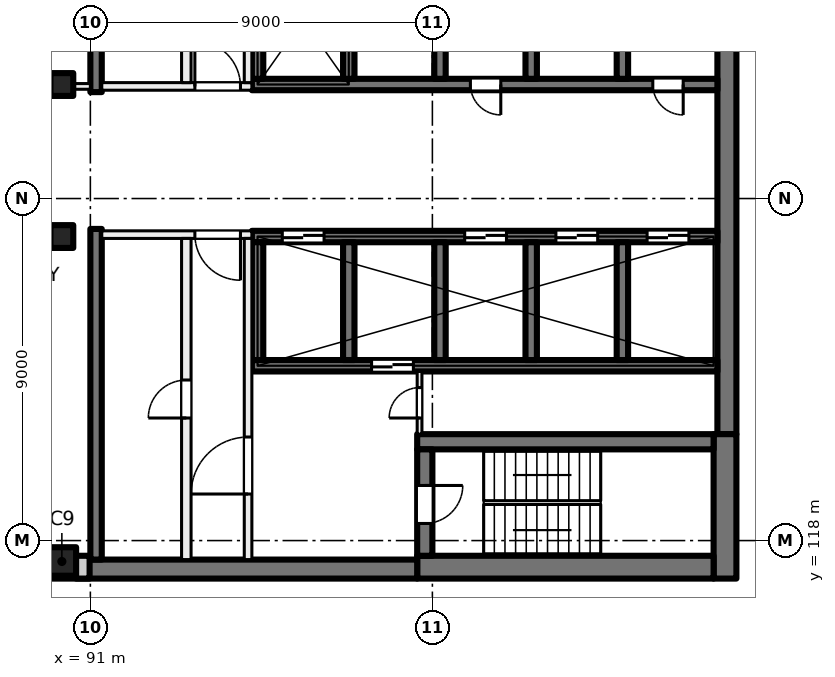
"""IFC4 building model, lengths in metres.
Left out: names, types, materials, properties, quantities, classifications, styles, units other than length and angle.
Written with IfcOpenShell. Run it as: python <this file> out.ifc"""

import sys

from ifc_helpers import new_model, si_unit, direction, frame, frame_2d, origin, origin_2d, place, context, subcontext, project, spatial, rectangle, extrude, element, fill, save


model = new_model("IFC4")
c1 = context("Model", 3, precision=1e-05, world=origin(), true_north=direction((0.0, 1.0)))
c2 = subcontext(c1, "Body", "Model", "MODEL_VIEW")
j1 = project(units=[si_unit("LENGTHUNIT", "METRE"), si_unit("PLANEANGLEUNIT", "RADIAN")], contexts=[c1])
p1 = place(None, origin())
s1 = spatial("IfcSite", under=j1, at=p1, CompositionType="ELEMENT")
p2 = place(p1, origin())
s2 = spatial("IfcBuilding", under=s1, at=p2, CompositionType="ELEMENT")
p3 = place(p2, frame((0.0, 0.0, 196.0)))
s3 = spatial("IfcBuildingStorey", under=s2, at=p3, CompositionType="ELEMENT", Elevation=196.0)
for number, where, z_axis, x_axis in (
    (1, (90.25, 130.0, 0.0), (0.0, 0.0, 1.0), (1.0, 0.0, 0.0)),
    (2, (90.25, 126.0, 0.0), (0.0, 0.0, 1.0), (1.0, 0.0, 0.0)),
):
    element("IfcColumn", number, at=place(p3, frame(where, z_axis=z_axis, x_axis=x_axis)), inside=s3, PredefinedType="COLUMN", context=c2, shape_type="SweptSolid", body=[
        extrude(rectangle(XDim=0.6, YDim=0.6, at=origin_2d()), origin(), (0.0, 0.0, 1.0), 4.0),
    ])
p4 = place(p3, frame((90.25, 117.45, 0.0), z_axis=(0.0, 0.0, 1.0), x_axis=(1.0, 0.0, 0.0)))
e3 = element("IfcColumn", 3, at=p4, inside=s3, PredefinedType="COLUMN", context=c2, shape_type="SweptSolid", body=[
    extrude(rectangle(XDim=0.75, YDim=0.75, at=origin_2d()), origin(), (0.0, 0.0, 1.0), 4.0),
])
p5 = place(p3, frame((107.75, 135.2, 0.0), z_axis=(0.0, 0.0, 1.0), x_axis=(0.0, -1.0, 0.0)))
e4 = element("IfcWall", 4, at=p5, inside=s3, PredefinedType="SHEAR", context=c2, shape_type="SweptSolid", body=[
    extrude(rectangle(XDim=14.4, YDim=0.5, at=frame_2d((7.2, 0.0))), origin(), (0.0, 0.0, 1.0), 4.0),
])
p6 = place(p3, frame((107.7, 120.8, 0.0), z_axis=(0.0, 0.0, 1.0), x_axis=(0.0, -1.0, 0.0)))
e5 = element("IfcWall", 5, at=p6, inside=s3, PredefinedType="SHEAR", context=c2, shape_type="SweptSolid", body=[
    extrude(rectangle(XDim=3.8, YDim=0.6, at=frame_2d((1.9, 0.0))), origin(), (0.0, 0.0, 1.0), 4.0),
])
p7 = place(p3, frame((107.4, 117.3, 0.0), z_axis=(0.0, 0.0, 1.0), x_axis=(-1.0, 0.0, 0.0)))
e6 = element("IfcWall", 6, at=p7, inside=s3, PredefinedType="SHEAR", context=c2, shape_type="SweptSolid", body=[
    extrude(rectangle(XDim=7.8, YDim=0.6, at=frame_2d((3.9, 0.0))), origin(), (0.0, 0.0, 1.0), 4.0),
])
p8 = place(p3, frame((99.6, 117.25, 0.0), z_axis=(0.0, 0.0, 1.0), x_axis=(-1.0, 0.0, 0.0)))
e7 = element("IfcWall", 7, at=p8, inside=s3, PredefinedType="SHEAR", context=c2, shape_type="SweptSolid", body=[
    extrude(rectangle(XDim=8.975, YDim=0.5, at=frame_2d((4.488, 0.0))), origin(), (0.0, 0.0, 1.0), 4.0),
])
p9 = place(p3, frame((107.4, 120.6, 0.0), z_axis=(0.0, 0.0, 1.0), x_axis=(-1.0, 0.0, 0.0)))
e8 = element("IfcWall", 8, at=p9, inside=s3, PredefinedType="SHEAR", context=c2, shape_type="SweptSolid", body=[
    extrude(rectangle(XDim=7.8, YDim=0.4, at=frame_2d((3.9, 0.0))), origin(), (0.0, 0.0, 1.0), 4.0),
])
p10 = place(p3, frame((99.8, 120.4, 0.0), z_axis=(0.0, 0.0, 1.0), x_axis=(0.0, -1.0, 0.0)))
e9 = element("IfcWall", 9, at=p10, inside=s3, PredefinedType="SHEAR", context=c2, shape_type="SweptSolid", body=[
    extrude(rectangle(XDim=2.8, YDim=0.4, at=frame_2d((1.4, 0.0))), origin(), (0.0, 0.0, 1.0), 4.0),
])
p11 = place(p10, frame((0.95, 0.0, 0.0)))
e10 = element("IfcOpeningElement", 10, at=p11, cuts=e9, PredefinedType="OPENING", context=c2, shape_type="SweptSolid", body=[
    extrude(rectangle(XDim=1.0, YDim=2.1, at=frame_2d((0.5, 1.05))), frame((0.0, 0.21, 0.0), z_axis=(0.0, -1.0, 0.0), x_axis=(1.0, 0.0, 0.0)), (0.0, 0.0, 1.0), 0.42),
])
p12 = place(p3, frame((107.5, 130.0, 0.0), z_axis=(0.0, 0.0, 1.0), x_axis=(-1.0, 0.0, 0.0)))
e11 = element("IfcWall", 11, at=p12, inside=s3, PredefinedType="SHEAR", context=c2, shape_type="SweptSolid", body=[
    extrude(rectangle(XDim=12.25, YDim=0.3, at=frame_2d((6.125, 0.0))), origin(), (0.0, 0.0, 1.0), 4.0),
])
p13 = place(p12, frame((0.9, 0.0, 0.0)))
e12 = element("IfcOpeningElement", 12, at=p13, cuts=e11, PredefinedType="OPENING", context=c2, shape_type="SweptSolid", body=[
    extrude(rectangle(XDim=0.8, YDim=2.1, at=frame_2d((0.4, 1.05))), frame((0.0, 0.16, 0.0), z_axis=(0.0, -1.0, 0.0), x_axis=(1.0, 0.0, 0.0)), (0.0, 0.0, 1.0), 0.32),
])
p14 = place(p12, frame((5.7, 0.0, 0.0)))
e13 = element("IfcOpeningElement", 13, at=p14, cuts=e11, PredefinedType="OPENING", context=c2, shape_type="SweptSolid", body=[
    extrude(rectangle(XDim=0.8, YDim=2.1, at=frame_2d((0.4, 1.05))), frame((0.0, 0.16, 0.0), z_axis=(0.0, -1.0, 0.0), x_axis=(1.0, 0.0, 0.0)), (0.0, 0.0, 1.0), 0.32),
])
for number, where, z_axis, x_axis in (
    (14, (105.0, 133.25, 0.0), (0.0, 0.0, 1.0), (0.0, -1.0, 0.0)),
    (15, (102.6, 133.25, 0.0), (0.0, 0.0, 1.0), (0.0, -1.0, 0.0)),
    (16, (100.2, 133.25, 0.0), (0.0, 0.0, 1.0), (0.0, -1.0, 0.0)),
    (17, (97.8, 133.25, 0.0), (0.0, 0.0, 1.0), (0.0, -1.0, 0.0)),
    (18, (95.4, 133.25, 0.0), (0.0, 0.0, 1.0), (0.0, -1.0, 0.0)),
):
    element("IfcWall", number, at=place(p3, frame(where, z_axis=z_axis, x_axis=x_axis)), inside=s3, PredefinedType="SHEAR", context=c2, shape_type="SweptSolid", body=[
        extrude(rectangle(XDim=3.1, YDim=0.3, at=frame_2d((1.55, 0.0))), origin(), (0.0, 0.0, 1.0), 4.0),
    ])
p15 = place(p3, frame((107.5, 126.0, 0.0), z_axis=(0.0, 0.0, 1.0), x_axis=(-1.0, 0.0, 0.0)))
e19 = element("IfcWall", 19, at=p15, inside=s3, PredefinedType="SHEAR", context=c2, shape_type="SweptSolid", body=[
    extrude(rectangle(XDim=12.25, YDim=0.3, at=frame_2d((6.125, 0.0))), origin(), (0.0, 0.0, 1.0), 4.0),
])
p16 = place(p15, frame((0.75, 0.0, 0.0)))
e20 = element("IfcOpeningElement", 20, at=p16, cuts=e19, PredefinedType="OPENING", context=c2, shape_type="SweptSolid", body=[
    extrude(rectangle(XDim=1.1, YDim=2.1, at=frame_2d((0.55, 1.05))), frame((0.0, 0.16, 0.0), z_axis=(0.0, -1.0, 0.0), x_axis=(1.0, 0.0, 0.0)), (0.0, 0.0, 1.0), 0.32),
])
p17 = place(p15, frame((3.15, 0.0, 0.0)))
e21 = element("IfcOpeningElement", 21, at=p17, cuts=e19, PredefinedType="OPENING", context=c2, shape_type="SweptSolid", body=[
    extrude(rectangle(XDim=1.1, YDim=2.1, at=frame_2d((0.55, 1.05))), frame((0.0, 0.16, 0.0), z_axis=(0.0, -1.0, 0.0), x_axis=(1.0, 0.0, 0.0)), (0.0, 0.0, 1.0), 0.32),
])
p18 = place(p15, frame((5.55, 0.0, 0.0)))
e22 = element("IfcOpeningElement", 22, at=p18, cuts=e19, PredefinedType="OPENING", context=c2, shape_type="SweptSolid", body=[
    extrude(rectangle(XDim=1.1, YDim=2.1, at=frame_2d((0.55, 1.05))), frame((0.0, 0.16, 0.0), z_axis=(0.0, -1.0, 0.0), x_axis=(1.0, 0.0, 0.0)), (0.0, 0.0, 1.0), 0.32),
])
p19 = place(p15, frame((10.35, 0.0, 0.0)))
e23 = element("IfcOpeningElement", 23, at=p19, cuts=e19, PredefinedType="OPENING", context=c2, shape_type="SweptSolid", body=[
    extrude(rectangle(XDim=1.1, YDim=2.1, at=frame_2d((0.55, 1.05))), frame((0.0, 0.16, 0.0), z_axis=(0.0, -1.0, 0.0), x_axis=(1.0, 0.0, 0.0)), (0.0, 0.0, 1.0), 0.32),
])
p20 = place(p3, frame((107.5, 122.6, 0.0), z_axis=(0.0, 0.0, 1.0), x_axis=(-1.0, 0.0, 0.0)))
e24 = element("IfcWall", 24, at=p20, inside=s3, PredefinedType="SHEAR", context=c2, shape_type="SweptSolid", body=[
    extrude(rectangle(XDim=12.25, YDim=0.3, at=frame_2d((6.125, 0.0))), origin(), (0.0, 0.0, 1.0), 4.0),
])
p21 = place(p20, frame((8.0, 0.0, 0.0)))
e25 = element("IfcOpeningElement", 25, at=p21, cuts=e24, PredefinedType="OPENING", context=c2, shape_type="SweptSolid", body=[
    extrude(rectangle(XDim=1.1, YDim=2.1, at=frame_2d((0.55, 1.05))), frame((0.0, 0.16, 0.0), z_axis=(0.0, -1.0, 0.0), x_axis=(1.0, 0.0, 0.0)), (0.0, 0.0, 1.0), 0.32),
])
for number, where, z_axis, x_axis in (
    (26, (105.0, 125.85, 0.0), (0.0, 0.0, 1.0), (0.0, -1.0, 0.0)),
    (27, (102.6, 125.85, 0.0), (0.0, 0.0, 1.0), (0.0, -1.0, 0.0)),
    (28, (100.2, 125.85, 0.0), (0.0, 0.0, 1.0), (0.0, -1.0, 0.0)),
    (29, (97.8, 125.85, 0.0), (0.0, 0.0, 1.0), (0.0, -1.0, 0.0)),
    (30, (95.4, 125.85, 0.0), (0.0, 0.0, 1.0), (0.0, -1.0, 0.0)),
):
    element("IfcWall", number, at=place(p3, frame(where, z_axis=z_axis, x_axis=x_axis)), inside=s3, PredefinedType="SHEAR", context=c2, shape_type="SweptSolid", body=[
        extrude(rectangle(XDim=3.1, YDim=0.3, at=frame_2d((1.55, 0.0))), origin(), (0.0, 0.0, 1.0), 4.0),
    ])
for number, where, z_axis, x_axis in (
    (31, (91.15, 138.5, 0.0), (0.0, 0.0, 1.0), (0.0, -1.0, 0.0)),
    (32, (91.15, 126.2, 0.0), (0.0, 0.0, 1.0), (0.0, -1.0, 0.0)),
):
    element("IfcWall", number, at=place(p3, frame(where, z_axis=z_axis, x_axis=x_axis)), inside=s3, PredefinedType="SHEAR", context=c2, shape_type="SweptSolid", body=[
        extrude(rectangle(XDim=8.7, YDim=0.3, at=frame_2d((4.35, 0.0))), origin(), (0.0, 0.0, 1.0), 4.0),
    ])
p22 = place(p3, frame((90.98, 117.3, 0.0), z_axis=(0.0, 0.0, 1.0), x_axis=(-1.0, 0.0, 0.0)))
e33 = element("IfcWall", 33, at=p22, inside=s3, PredefinedType="SOLIDWALL", context=c2, shape_type="SweptSolid", body=[
    extrude(rectangle(XDim=33.745, YDim=0.6, at=frame_2d((16.873, 0.0))), origin(), (0.0, 0.0, 1.0), 3.625),
])
p23 = place(p22, frame((1.48, 0.0, 0.9)))
e34 = element("IfcOpeningElement", 34, at=p23, cuts=e33, PredefinedType="OPENING", context=c2, shape_type="SweptSolid", body=[
    extrude(rectangle(XDim=3.0, YDim=2.4, at=frame_2d((1.5, 1.2))), frame((0.0, 0.31, 0.0), z_axis=(0.0, -1.0, 0.0), x_axis=(1.0, 0.0, 0.0)), (0.0, 0.0, 1.0), 0.62),
])
p24 = place(p22, frame((5.98, 0.0, 0.9)))
e35 = element("IfcOpeningElement", 35, at=p24, cuts=e33, PredefinedType="OPENING", context=c2, shape_type="SweptSolid", body=[
    extrude(rectangle(XDim=3.0, YDim=2.4, at=frame_2d((1.5, 1.2))), frame((0.0, 0.31, 0.0), z_axis=(0.0, -1.0, 0.0), x_axis=(1.0, 0.0, 0.0)), (0.0, 0.0, 1.0), 0.62),
])
p25 = place(p22, frame((10.48, 0.0, 0.9)))
e36 = element("IfcOpeningElement", 36, at=p25, cuts=e33, PredefinedType="OPENING", context=c2, shape_type="SweptSolid", body=[
    extrude(rectangle(XDim=3.0, YDim=2.4, at=frame_2d((1.5, 1.2))), frame((0.0, 0.31, 0.0), z_axis=(0.0, -1.0, 0.0), x_axis=(1.0, 0.0, 0.0)), (0.0, 0.0, 1.0), 0.62),
])
p26 = place(p22, frame((14.98, 0.0, 0.9)))
e37 = element("IfcOpeningElement", 37, at=p26, cuts=e33, PredefinedType="OPENING", context=c2, shape_type="SweptSolid", body=[
    extrude(rectangle(XDim=3.0, YDim=2.4, at=frame_2d((1.5, 1.2))), frame((0.0, 0.31, 0.0), z_axis=(0.0, -1.0, 0.0), x_axis=(1.0, 0.0, 0.0)), (0.0, 0.0, 1.0), 0.62),
])
p27 = place(p22, frame((19.48, 0.0, 0.9)))
e38 = element("IfcOpeningElement", 38, at=p27, cuts=e33, PredefinedType="OPENING", context=c2, shape_type="SweptSolid", body=[
    extrude(rectangle(XDim=3.0, YDim=2.4, at=frame_2d((1.5, 1.2))), frame((0.0, 0.31, 0.0), z_axis=(0.0, -1.0, 0.0), x_axis=(1.0, 0.0, 0.0)), (0.0, 0.0, 1.0), 0.62),
])
p28 = place(p22, frame((23.98, 0.0, 0.9)))
e39 = element("IfcOpeningElement", 39, at=p28, cuts=e33, PredefinedType="OPENING", context=c2, shape_type="SweptSolid", body=[
    extrude(rectangle(XDim=3.0, YDim=2.4, at=frame_2d((1.5, 1.2))), frame((0.0, 0.31, 0.0), z_axis=(0.0, -1.0, 0.0), x_axis=(1.0, 0.0, 0.0)), (0.0, 0.0, 1.0), 0.62),
])
p29 = place(p22, frame((28.48, 0.0, 0.9)))
e40 = element("IfcOpeningElement", 40, at=p29, cuts=e33, PredefinedType="OPENING", context=c2, shape_type="SweptSolid", body=[
    extrude(rectangle(XDim=3.0, YDim=2.4, at=frame_2d((1.5, 1.2))), frame((0.0, 0.31, 0.0), z_axis=(0.0, -1.0, 0.0), x_axis=(1.0, 0.0, 0.0)), (0.0, 0.0, 1.0), 0.62),
])
p30 = place(p3, frame((95.25, 126.05, 0.0), z_axis=(0.0, 0.0, 1.0), x_axis=(-1.0, 0.0, 0.0)))
e41 = element("IfcWall", 41, at=p30, inside=s3, PredefinedType="PARTITIONING", context=c2, shape_type="SweptSolid", body=[
    extrude(rectangle(XDim=3.95, YDim=0.2, at=frame_2d((1.975, 0.0))), origin(), (0.0, 0.0, 1.0), 3.625),
])
p31 = place(p30, frame((0.3, 0.0, 0.0)))
e42 = element("IfcOpeningElement", 42, at=p31, cuts=e41, PredefinedType="OPENING", context=c2, shape_type="SweptSolid", body=[
    extrude(rectangle(XDim=1.2, YDim=2.1, at=frame_2d((0.6, 1.05))), frame((0.0, 0.11, 0.0), z_axis=(0.0, -1.0, 0.0), x_axis=(1.0, 0.0, 0.0)), (0.0, 0.0, 1.0), 0.22),
])
p32 = place(p3, frame((95.15, 117.5, 0.0), z_axis=(0.0, 0.0, 1.0), x_axis=(0.0, 1.0, 0.0)))
e43 = element("IfcWall", 43, at=p32, inside=s3, PredefinedType="PARTITIONING", context=c2, shape_type="SweptSolid", body=[
    extrude(rectangle(XDim=8.45, YDim=0.2, at=frame_2d((4.225, 0.0))), origin(), (0.0, 0.0, 1.0), 3.625),
])
p33 = place(p32, frame((1.725, 0.0, 0.0)))
e44 = element("IfcOpeningElement", 44, at=p33, cuts=e43, PredefinedType="OPENING", context=c2, shape_type="SweptSolid", body=[
    extrude(rectangle(XDim=1.5, YDim=2.1, at=frame_2d((0.75, 1.05))), frame((0.0, 0.11, 0.0), z_axis=(0.0, -1.0, 0.0), x_axis=(1.0, 0.0, 0.0)), (0.0, 0.0, 1.0), 0.22),
])
p34 = place(p3, frame((93.525, 117.5, 0.0), z_axis=(0.0, 0.0, 1.0), x_axis=(0.0, 1.0, 0.0)))
e45 = element("IfcWall", 45, at=p34, inside=s3, PredefinedType="PARTITIONING", context=c2, shape_type="SweptSolid", body=[
    extrude(rectangle(XDim=8.45, YDim=0.25, at=frame_2d((4.225, 0.0))), origin(), (0.0, 0.0, 1.0), 3.625),
])
p35 = place(p34, frame((3.725, 0.0, 0.0)))
e46 = element("IfcOpeningElement", 46, at=p35, cuts=e45, PredefinedType="OPENING", context=c2, shape_type="SweptSolid", body=[
    extrude(rectangle(XDim=1.0, YDim=2.1, at=frame_2d((0.5, 1.05))), frame((0.0, 0.135, 0.0), z_axis=(0.0, -1.0, 0.0), x_axis=(1.0, 0.0, 0.0)), (0.0, 0.0, 1.0), 0.27),
])
p36 = place(p3, frame((99.663, 120.8, 0.0), z_axis=(0.0, 0.0, 1.0), x_axis=(0.0, 1.0, 0.0)))
e47 = element("IfcWall", 47, at=p36, inside=s3, PredefinedType="PARTITIONING", context=c2, shape_type="SweptSolid", body=[
    extrude(rectangle(XDim=1.65, YDim=0.125, at=frame_2d((0.825, 0.0))), origin(), (0.0, 0.0, 1.0), 3.625),
])
p37 = place(p36, frame((0.425, 0.0, 0.0)))
e48 = element("IfcOpeningElement", 48, at=p37, cuts=e47, PredefinedType="OPENING", context=c2, shape_type="SweptSolid", body=[
    extrude(rectangle(XDim=0.8, YDim=2.1, at=frame_2d((0.4, 1.05))), frame((0.0, 0.073, 0.0), z_axis=(0.0, -1.0, 0.0), x_axis=(1.0, 0.0, 0.0)), (0.0, 0.0, 1.0), 0.145),
])
p38 = place(p3, frame((91.3, 129.95, 0.0), z_axis=(0.0, 0.0, 1.0), x_axis=(1.0, 0.0, 0.0)))
e49 = element("IfcWall", 49, at=p38, inside=s3, PredefinedType="PARTITIONING", context=c2, shape_type="SweptSolid", body=[
    extrude(rectangle(XDim=3.95, YDim=0.2, at=frame_2d((1.975, 0.0))), origin(), (0.0, 0.0, 1.0), 3.625),
])
p39 = place(p38, frame((2.45, 0.0, 0.0)))
e50 = element("IfcOpeningElement", 50, at=p39, cuts=e49, PredefinedType="OPENING", context=c2, shape_type="SweptSolid", body=[
    extrude(rectangle(XDim=1.2, YDim=2.1, at=frame_2d((0.6, 1.05))), frame((0.0, 0.11, 0.0), z_axis=(0.0, -1.0, 0.0), x_axis=(1.0, 0.0, 0.0)), (0.0, 0.0, 1.0), 0.22),
])
p40 = place(p3, frame((95.15, 130.05, 0.0), z_axis=(0.0, 0.0, 1.0), x_axis=(0.0, 1.0, 0.0)))
e51 = element("IfcWall", 51, at=p40, inside=s3, PredefinedType="PARTITIONING", context=c2, shape_type="SweptSolid", body=[
    extrude(rectangle(XDim=8.45, YDim=0.2, at=frame_2d((4.225, 0.0))), origin(), (0.0, 0.0, 1.0), 3.625),
])
p41 = place(p40, frame((5.225, 0.0, 0.0)))
e52 = element("IfcOpeningElement", 52, at=p41, cuts=e51, PredefinedType="OPENING", context=c2, shape_type="SweptSolid", body=[
    extrude(rectangle(XDim=1.5, YDim=2.1, at=frame_2d((0.75, 1.05))), frame((0.0, 0.11, 0.0), z_axis=(0.0, -1.0, 0.0), x_axis=(1.0, 0.0, 0.0)), (0.0, 0.0, 1.0), 0.22),
])
p42 = place(p3, frame((93.525, 130.05, 0.0), z_axis=(0.0, 0.0, 1.0), x_axis=(0.0, 1.0, 0.0)))
e53 = element("IfcWall", 53, at=p42, inside=s3, PredefinedType="PARTITIONING", context=c2, shape_type="SweptSolid", body=[
    extrude(rectangle(XDim=8.45, YDim=0.25, at=frame_2d((4.225, 0.0))), origin(), (0.0, 0.0, 1.0), 3.625),
])
p43 = place(p42, frame((2.39, 0.0, 0.0)))
e54 = element("IfcOpeningElement", 54, at=p43, cuts=e53, PredefinedType="OPENING", context=c2, shape_type="SweptSolid", body=[
    extrude(rectangle(XDim=0.8, YDim=2.1, at=frame_2d((0.4, 1.05))), frame((0.0, 0.135, 0.0), z_axis=(0.0, -1.0, 0.0), x_axis=(1.0, 0.0, 0.0)), (0.0, 0.0, 1.0), 0.27),
])
p44 = place(p42, frame((6.565, 0.0, 0.0)))
e55 = element("IfcOpeningElement", 55, at=p44, cuts=e53, PredefinedType="OPENING", context=c2, shape_type="SweptSolid", body=[
    extrude(rectangle(XDim=1.0, YDim=2.1, at=frame_2d((0.5, 1.05))), frame((0.0, 0.135, 0.0), z_axis=(0.0, -1.0, 0.0), x_axis=(1.0, 0.0, 0.0)), (0.0, 0.0, 1.0), 0.27),
])
p45 = place(p3, frame((85.825, 129.95, 0.0), z_axis=(0.0, 0.0, 1.0), x_axis=(1.0, 0.0, 0.0)))
e56 = element("IfcWall", 56, at=p45, inside=s3, PredefinedType="PARTITIONING", context=c2, shape_type="SweptSolid", body=[
    extrude(rectangle(XDim=5.175, YDim=0.15, at=frame_2d((2.587, 0.0))), origin(), (0.0, 0.0, 1.0), 3.625),
])
p46 = place(p45, frame((2.077, 0.0, 0.0)))
e57 = element("IfcOpeningElement", 57, at=p46, cuts=e56, PredefinedType="OPENING", context=c2, shape_type="SweptSolid", body=[
    extrude(rectangle(XDim=1.0, YDim=2.1, at=frame_2d((0.5, 1.05))), frame((0.0, 0.085, 0.0), z_axis=(0.0, -1.0, 0.0), x_axis=(1.0, 0.0, 0.0)), (0.0, 0.0, 1.0), 0.17),
])
p47 = place(p16, origin())
e58 = element("IfcDoor", 58, at=p47, inside=s3, OperationType="DOUBLE_DOOR_SLIDING", PredefinedType="DOOR", context=c2, shape_type="SweptSolid", body=[
    extrude(rectangle(XDim=1.1, YDim=2.1, at=frame_2d((0.55, 1.05))), frame((0.0, 0.025, 0.0), z_axis=(0.0, -1.0, 0.0), x_axis=(1.0, 0.0, 0.0)), (0.0, 0.0, 1.0), 0.05),
])
fill(e20, e58)
p48 = place(p17, origin())
e59 = element("IfcDoor", 59, at=p48, inside=s3, OperationType="DOUBLE_DOOR_SLIDING", PredefinedType="DOOR", context=c2, shape_type="SweptSolid", body=[
    extrude(rectangle(XDim=1.1, YDim=2.1, at=frame_2d((0.55, 1.05))), frame((0.0, 0.025, 0.0), z_axis=(0.0, -1.0, 0.0), x_axis=(1.0, 0.0, 0.0)), (0.0, 0.0, 1.0), 0.05),
])
fill(e21, e59)
p49 = place(p18, origin())
e60 = element("IfcDoor", 60, at=p49, inside=s3, OperationType="DOUBLE_DOOR_SLIDING", PredefinedType="DOOR", context=c2, shape_type="SweptSolid", body=[
    extrude(rectangle(XDim=1.1, YDim=2.1, at=frame_2d((0.55, 1.05))), frame((0.0, 0.025, 0.0), z_axis=(0.0, -1.0, 0.0), x_axis=(1.0, 0.0, 0.0)), (0.0, 0.0, 1.0), 0.05),
])
fill(e22, e60)
p50 = place(p19, origin())
e61 = element("IfcDoor", 61, at=p50, inside=s3, OperationType="DOUBLE_DOOR_SLIDING", PredefinedType="DOOR", context=c2, shape_type="SweptSolid", body=[
    extrude(rectangle(XDim=1.1, YDim=2.1, at=frame_2d((0.55, 1.05))), frame((0.0, 0.025, 0.0), z_axis=(0.0, -1.0, 0.0), x_axis=(1.0, 0.0, 0.0)), (0.0, 0.0, 1.0), 0.05),
])
fill(e23, e61)
p51 = place(p13, origin())
e62 = element("IfcDoor", 62, at=p51, inside=s3, OperationType="SINGLE_SWING_LEFT", PredefinedType="DOOR", context=c2, shape_type="SweptSolid", body=[
    extrude(rectangle(XDim=0.8, YDim=2.1, at=frame_2d((0.4, 1.05))), frame((0.0, 0.025, 0.0), z_axis=(0.0, -1.0, 0.0), x_axis=(1.0, 0.0, 0.0)), (0.0, 0.0, 1.0), 0.05),
])
fill(e12, e62)
p52 = place(p14, origin())
e63 = element("IfcDoor", 63, at=p52, inside=s3, OperationType="SINGLE_SWING_RIGHT", PredefinedType="DOOR", context=c2, shape_type="SweptSolid", body=[
    extrude(rectangle(XDim=0.8, YDim=2.1, at=frame_2d((0.4, 1.05))), frame((0.0, 0.025, 0.0), z_axis=(0.0, -1.0, 0.0), x_axis=(1.0, 0.0, 0.0)), (0.0, 0.0, 1.0), 0.05),
])
fill(e13, e63)
p53 = place(p31, origin())
e64 = element("IfcDoor", 64, at=p53, inside=s3, OperationType="DOUBLE_DOOR_SINGLE_SWING", PredefinedType="DOOR", context=c2, shape_type="SweptSolid", body=[
    extrude(rectangle(XDim=1.2, YDim=2.1, at=frame_2d((0.6, 1.05))), frame((0.0, 0.025, 0.0), z_axis=(0.0, -1.0, 0.0), x_axis=(1.0, 0.0, 0.0)), (0.0, 0.0, 1.0), 0.05),
])
fill(e42, e64)
p54 = place(p33, origin())
e65 = element("IfcDoor", 65, at=p54, inside=s3, OperationType="DOUBLE_DOOR_SINGLE_SWING", PredefinedType="DOOR", context=c2, shape_type="SweptSolid", body=[
    extrude(rectangle(XDim=1.5, YDim=2.1, at=frame_2d((0.75, 1.05))), frame((0.0, 0.025, 0.0), z_axis=(0.0, -1.0, 0.0), x_axis=(1.0, 0.0, 0.0)), (0.0, 0.0, 1.0), 0.05),
])
fill(e44, e65)
p55 = place(p11, origin())
e66 = element("IfcDoor", 66, at=p55, inside=s3, OperationType="SINGLE_SWING_LEFT", PredefinedType="DOOR", context=c2, shape_type="SweptSolid", body=[
    extrude(rectangle(XDim=1.0, YDim=2.1, at=frame_2d((0.5, 1.05))), frame((0.0, 0.025, 0.0), z_axis=(0.0, -1.0, 0.0), x_axis=(1.0, 0.0, 0.0)), (0.0, 0.0, 1.0), 0.05),
])
fill(e10, e66)
p56 = place(p37, origin())
e67 = element("IfcDoor", 67, at=p56, inside=s3, OperationType="SINGLE_SWING_RIGHT", PredefinedType="DOOR", context=c2, shape_type="SweptSolid", body=[
    extrude(rectangle(XDim=0.8, YDim=2.1, at=frame_2d((0.4, 1.05))), frame((0.0, 0.025, 0.0), z_axis=(0.0, -1.0, 0.0), x_axis=(1.0, 0.0, 0.0)), (0.0, 0.0, 1.0), 0.05),
])
fill(e48, e67)
p57 = place(p35, origin())
e68 = element("IfcDoor", 68, at=p57, inside=s3, OperationType="SINGLE_SWING_LEFT", PredefinedType="DOOR", context=c2, shape_type="SweptSolid", body=[
    extrude(rectangle(XDim=1.0, YDim=2.1, at=frame_2d((0.5, 1.05))), frame((0.0, 0.025, 0.0), z_axis=(0.0, -1.0, 0.0), x_axis=(1.0, 0.0, 0.0)), (0.0, 0.0, 1.0), 0.05),
])
fill(e46, e68)
p58 = place(p39, origin())
e69 = element("IfcDoor", 69, at=p58, inside=s3, OperationType="DOUBLE_DOOR_SINGLE_SWING", PredefinedType="DOOR", context=c2, shape_type="SweptSolid", body=[
    extrude(rectangle(XDim=1.2, YDim=2.1, at=frame_2d((0.6, 1.05))), frame((0.0, 0.025, 0.0), z_axis=(0.0, -1.0, 0.0), x_axis=(1.0, 0.0, 0.0)), (0.0, 0.0, 1.0), 0.05),
])
fill(e50, e69)
p59 = place(p21, origin())
e70 = element("IfcDoor", 70, at=p59, inside=s3, OperationType="DOUBLE_DOOR_SLIDING", PredefinedType="DOOR", context=c2, shape_type="SweptSolid", body=[
    extrude(rectangle(XDim=1.1, YDim=2.1, at=frame_2d((0.55, 1.05))), frame((0.0, 0.025, 0.0), z_axis=(0.0, -1.0, 0.0), x_axis=(1.0, 0.0, 0.0)), (0.0, 0.0, 1.0), 0.05),
])
fill(e25, e70)
save(model, sys.argv[1])
